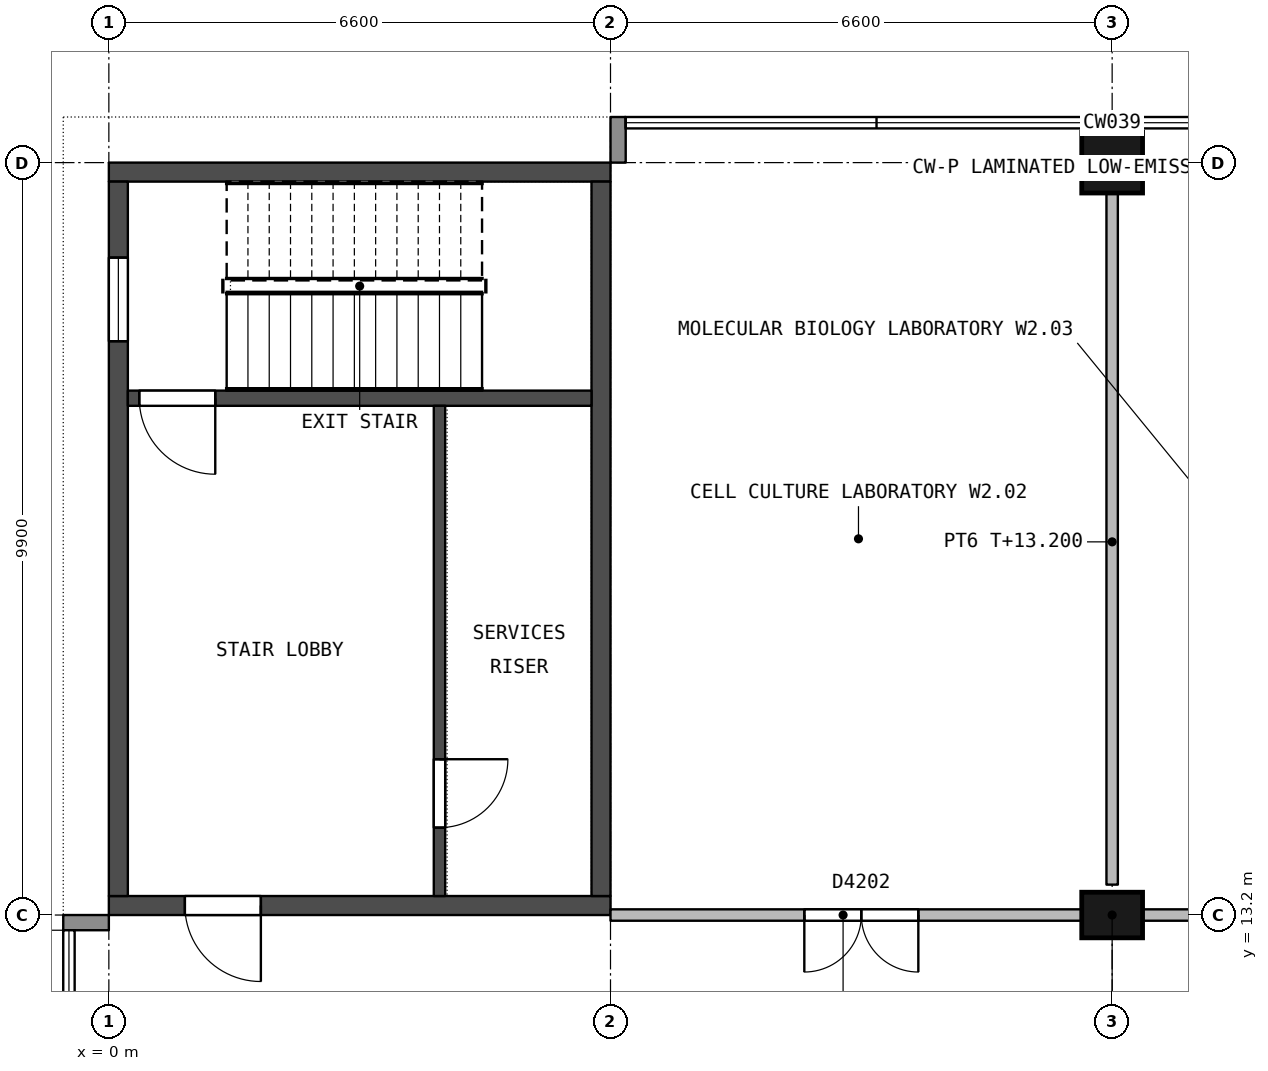
"""IFC4 building model, lengths in metres.
Left out: names, types, materials, properties, quantities, classifications, styles, units other than length and angle.
Written with IfcOpenShell. Run it as: python <this file> out.ifc"""

import sys

from ifc_helpers import new_model, si_unit, direction, frame, frame_2d, origin, origin_2d, place, context, subcontext, project, spatial, rectangle, extrude, element, fill, save


model = new_model("IFC4")
c1 = context("Model", 3, precision=1e-05, world=origin(), true_north=direction((0.0, 1.0)))
c2 = subcontext(c1, "Body", "Model", "MODEL_VIEW")
j1 = project(units=[si_unit("LENGTHUNIT", "METRE"), si_unit("PLANEANGLEUNIT", "RADIAN")], contexts=[c1])
p1 = place(None, origin())
s1 = spatial("IfcSite", under=j1, at=p1, CompositionType="ELEMENT")
p2 = place(p1, origin())
s2 = spatial("IfcBuilding", under=s1, at=p2, CompositionType="ELEMENT")
p3 = place(p2, frame((0.0, 0.0, 9.9)))
s3 = spatial("IfcBuildingStorey", under=s2, at=p3, CompositionType="ELEMENT", Elevation=9.9)
p4 = place(p3, frame((13.2, 13.2, 0.0), z_axis=(0.0, 0.0, 1.0), x_axis=(1.0, 0.0, 0.0)))
e1 = element("IfcColumn", 1, at=p4, inside=s3, PredefinedType="COLUMN", context=c2, shape_type="SweptSolid", body=[
    extrude(rectangle(XDim=0.8, YDim=0.6, at=origin_2d()), origin(), (0.0, 0.0, 1.0), 4.5),
])
p5 = place(p3, frame((13.2, 23.1, 0.0), z_axis=(0.0, 0.0, 1.0), x_axis=(1.0, 0.0, 0.0)))
e2 = element("IfcColumn", 2, at=p5, inside=s3, PredefinedType="COLUMN", context=c2, shape_type="SweptSolid", body=[
    extrude(rectangle(XDim=0.8, YDim=0.8, at=origin_2d()), origin(), (0.0, 0.0, 1.0), 4.5),
])
p6 = place(p3, frame((0.0, 13.325, 0.0), z_axis=(0.0, 0.0, 1.0), x_axis=(1.0, 0.0, 0.0)))
e3 = element("IfcWall", 3, at=p6, inside=s3, PredefinedType="SHEAR", context=c2, shape_type="SweptSolid", body=[
    extrude(rectangle(XDim=6.6, YDim=0.25, at=frame_2d((3.3, 0.0))), origin(), (0.0, 0.0, 1.0), 4.2),
])
p7 = place(p6, frame((1.0, 0.0, 0.0)))
e4 = element("IfcOpeningElement", 4, at=p7, cuts=e3, PredefinedType="OPENING", context=c2, shape_type="SweptSolid", body=[
    extrude(rectangle(XDim=1.0, YDim=2.1, at=frame_2d((0.5, 1.05))), frame((0.0, 0.135, 0.0), z_axis=(0.0, -1.0, 0.0), x_axis=(1.0, 0.0, 0.0)), (0.0, 0.0, 1.0), 0.27),
])
p8 = place(p3, frame((0.0, 22.975, 0.0), z_axis=(0.0, 0.0, 1.0), x_axis=(1.0, 0.0, 0.0)))
e5 = element("IfcWall", 5, at=p8, inside=s3, PredefinedType="SHEAR", context=c2, shape_type="SweptSolid", body=[
    extrude(rectangle(XDim=6.6, YDim=0.25, at=frame_2d((3.3, 0.0))), origin(), (0.0, 0.0, 1.0), 4.2),
])
p9 = place(p3, frame((0.125, 13.45, 0.0), z_axis=(0.0, 0.0, 1.0), x_axis=(0.0, 1.0, 0.0)))
e6 = element("IfcWall", 6, at=p9, inside=s3, PredefinedType="SHEAR", context=c2, shape_type="SweptSolid", body=[
    extrude(rectangle(XDim=9.4, YDim=0.25, at=frame_2d((4.7, 0.0))), origin(), (0.0, 0.0, 1.0), 4.2),
])
p10 = place(p9, frame((7.3, 0.0, 0.7)))
e7 = element("IfcOpeningElement", 7, at=p10, cuts=e6, PredefinedType="OPENING", context=c2, shape_type="SweptSolid", body=[
    extrude(rectangle(XDim=1.1, YDim=1.5, at=frame_2d((0.55, 0.75))), frame((0.0, 0.135, 0.0), z_axis=(0.0, -1.0, 0.0), x_axis=(1.0, 0.0, 0.0)), (0.0, 0.0, 1.0), 0.27),
])
p11 = place(p3, frame((6.475, 13.45, 0.0), z_axis=(0.0, 0.0, 1.0), x_axis=(0.0, 1.0, 0.0)))
e8 = element("IfcWall", 8, at=p11, inside=s3, PredefinedType="SHEAR", context=c2, shape_type="SweptSolid", body=[
    extrude(rectangle(XDim=9.4, YDim=0.25, at=frame_2d((4.7, 0.0))), origin(), (0.0, 0.0, 1.0), 4.2),
])
p12 = place(p3, frame((0.25, 20.0, 0.0), z_axis=(0.0, 0.0, 1.0), x_axis=(1.0, 0.0, 0.0)))
e9 = element("IfcWall", 9, at=p12, inside=s3, PredefinedType="SHEAR", context=c2, shape_type="SweptSolid", body=[
    extrude(rectangle(XDim=6.1, YDim=0.2, at=frame_2d((3.05, 0.0))), origin(), (0.0, 0.0, 1.0), 4.2),
])
p13 = place(p12, frame((0.15, 0.0, 0.0)))
e10 = element("IfcOpeningElement", 10, at=p13, cuts=e9, PredefinedType="OPENING", context=c2, shape_type="SweptSolid", body=[
    extrude(rectangle(XDim=1.0, YDim=2.1, at=frame_2d((0.5, 1.05))), frame((0.0, 0.11, 0.0), z_axis=(0.0, -1.0, 0.0), x_axis=(1.0, 0.0, 0.0)), (0.0, 0.0, 1.0), 0.22),
])
p14 = place(p3, frame((4.35, 13.45, 0.0), z_axis=(0.0, 0.0, 1.0), x_axis=(0.0, 1.0, 0.0)))
e11 = element("IfcWall", 11, at=p14, inside=s3, PredefinedType="SHEAR", context=c2, shape_type="SweptSolid", body=[
    extrude(rectangle(XDim=6.45, YDim=0.15, at=frame_2d((3.225, 0.0))), origin(), (0.0, 0.0, 1.0), 4.2),
])
p15 = place(p14, frame((0.9, 0.0, 0.0)))
e12 = element("IfcOpeningElement", 12, at=p15, cuts=e11, PredefinedType="OPENING", context=c2, shape_type="SweptSolid", body=[
    extrude(rectangle(XDim=0.9, YDim=2.1, at=frame_2d((0.45, 1.05))), frame((0.0, 0.085, 0.0), z_axis=(0.0, -1.0, 0.0), x_axis=(1.0, 0.0, 0.0)), (0.0, 0.0, 1.0), 0.17),
])
p16 = place(p3, frame((6.7, 23.1, 0.0), z_axis=(0.0, 0.0, 1.0), x_axis=(0.0, 1.0, 0.0)))
e13 = element("IfcWall", 13, at=p16, inside=s3, PredefinedType="STANDARD", context=c2, shape_type="SweptSolid", body=[
    extrude(rectangle(XDim=0.6, YDim=0.2, at=frame_2d((0.3, 0.0))), origin(), (0.0, 0.0, 1.0), 3.5),
])
p17 = place(p3, frame((0.0, 13.1, 0.0), z_axis=(0.0, 0.0, 1.0), x_axis=(-1.0, 0.0, 0.0)))
e14 = element("IfcWall", 14, at=p17, inside=s3, PredefinedType="STANDARD", context=c2, shape_type="SweptSolid", body=[
    extrude(rectangle(XDim=0.6, YDim=0.2, at=frame_2d((0.3, 0.0))), origin(), (0.0, 0.0, 1.0), 3.5),
])
p18 = place(p3, frame((12.8, 13.2, 0.0), z_axis=(0.0, 0.0, 1.0), x_axis=(-1.0, 0.0, 0.0)))
e15 = element("IfcWall", 15, at=p18, inside=s3, PredefinedType="PARTITIONING", context=c2, shape_type="SweptSolid", body=[
    extrude(rectangle(XDim=6.2, YDim=0.15, at=frame_2d((3.1, 0.0))), origin(), (0.0, 0.0, 1.0), 3.5),
])
p19 = place(p18, frame((2.15, 0.0, 0.0)))
e16 = element("IfcOpeningElement", 16, at=p19, cuts=e15, PredefinedType="OPENING", context=c2, shape_type="SweptSolid", body=[
    extrude(rectangle(XDim=1.5, YDim=2.1, at=frame_2d((0.75, 1.05))), frame((0.0, 0.085, 0.0), z_axis=(0.0, -1.0, 0.0), x_axis=(1.0, 0.0, 0.0)), (0.0, 0.0, 1.0), 0.17),
])
p20 = place(p3, frame((16.5, 13.2, 0.0), z_axis=(0.0, 0.0, 1.0), x_axis=(-1.0, 0.0, 0.0)))
e17 = element("IfcWall", 17, at=p20, inside=s3, PredefinedType="PARTITIONING", context=c2, shape_type="SweptSolid", body=[
    extrude(rectangle(XDim=2.9, YDim=0.15, at=frame_2d((1.45, 0.0))), origin(), (0.0, 0.0, 1.0), 3.5),
])
p21 = place(p3, frame((13.2, 13.6, 0.0), z_axis=(0.0, 0.0, 1.0), x_axis=(0.0, 1.0, 0.0)))
e18 = element("IfcWall", 18, at=p21, inside=s3, PredefinedType="PARTITIONING", context=c2, shape_type="SweptSolid", body=[
    extrude(rectangle(XDim=9.1, YDim=0.15, at=frame_2d((4.55, 0.0))), origin(), (0.0, 0.0, 1.0), 3.3),
])
p22 = place(p15, origin())
e19 = element("IfcDoor", 19, at=p22, inside=s3, OperationType="SINGLE_SWING_RIGHT", PredefinedType="DOOR", context=c2, shape_type="SweptSolid", body=[
    extrude(rectangle(XDim=0.9, YDim=2.1, at=frame_2d((0.45, 1.05))), frame((0.0, 0.025, 0.0), z_axis=(0.0, -1.0, 0.0), x_axis=(1.0, 0.0, 0.0)), (0.0, 0.0, 1.0), 0.05),
])
fill(e12, e19)
p23 = place(p7, origin())
e20 = element("IfcDoor", 20, at=p23, inside=s3, OperationType="SINGLE_SWING_RIGHT", PredefinedType="DOOR", context=c2, shape_type="SweptSolid", body=[
    extrude(rectangle(XDim=1.0, YDim=2.1, at=frame_2d((0.5, 1.05))), frame((0.0, 0.025, 0.0), z_axis=(0.0, -1.0, 0.0), x_axis=(1.0, 0.0, 0.0)), (0.0, 0.0, 1.0), 0.05),
])
fill(e4, e20)
p24 = place(p13, origin())
e21 = element("IfcDoor", 21, at=p24, inside=s3, OperationType="SINGLE_SWING_RIGHT", PredefinedType="DOOR", context=c2, shape_type="SweptSolid", body=[
    extrude(rectangle(XDim=1.0, YDim=2.1, at=frame_2d((0.5, 1.05))), frame((0.0, 0.025, 0.0), z_axis=(0.0, -1.0, 0.0), x_axis=(1.0, 0.0, 0.0)), (0.0, 0.0, 1.0), 0.05),
])
fill(e10, e21)
p25 = place(p10, origin())
e22 = element("IfcWindow", 22, at=p25, inside=s3, PartitioningType="SINGLE_PANEL", PredefinedType="WINDOW", context=c2, shape_type="SweptSolid", body=[
    extrude(rectangle(XDim=1.1, YDim=1.5, at=frame_2d((0.55, 0.75))), frame((0.0, 0.03, 0.0), z_axis=(0.0, -1.0, 0.0), x_axis=(1.0, 0.0, 0.0)), (0.0, 0.0, 1.0), 0.06),
])
fill(e7, e22)
p26 = place(p19, origin())
e23 = element("IfcDoor", 23, at=p26, inside=s3, OperationType="DOUBLE_DOOR_SINGLE_SWING", PredefinedType="DOOR", context=c2, shape_type="SweptSolid", body=[
    extrude(rectangle(XDim=1.5, YDim=2.1, at=frame_2d((0.75, 1.05))), frame((0.0, 0.027, 0.0), z_axis=(0.0, -1.0, 0.0), x_axis=(1.0, 0.0, 0.0)), (0.0, 0.0, 1.0), 0.054),
])
fill(e16, e23)
save(model, sys.argv[1])
